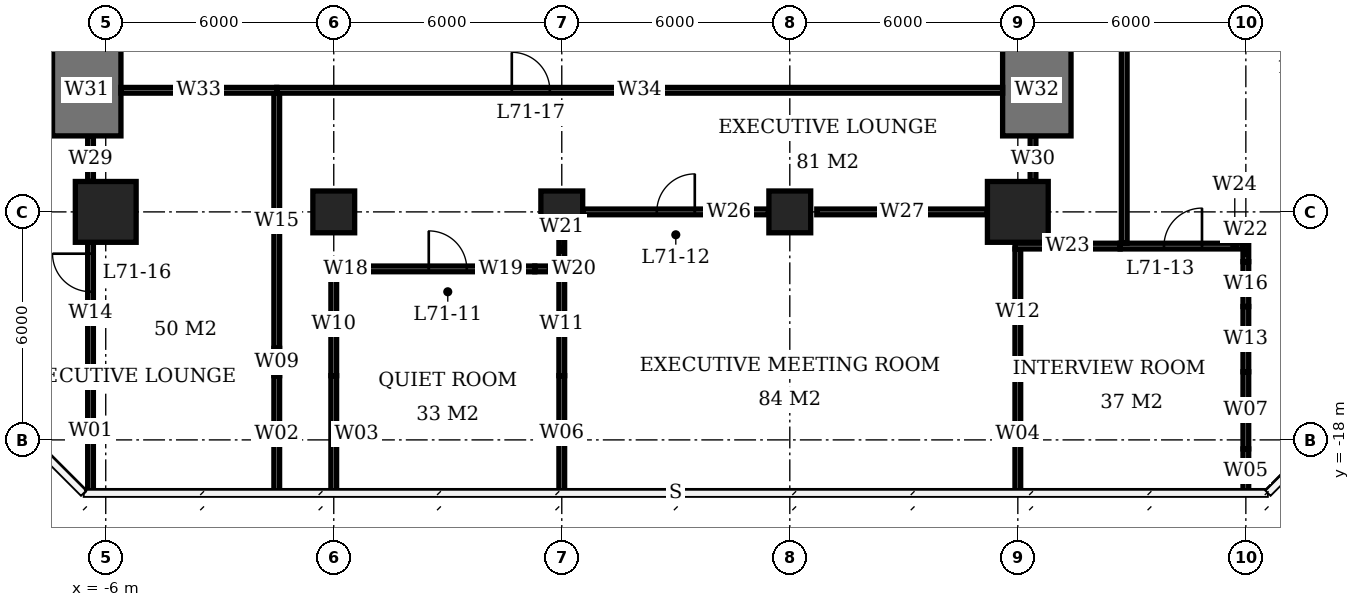
"""IFC4 building model, lengths in metres.
Left out: names, types, materials, properties, quantities, classifications, styles, units other than length and angle.
Written with IfcOpenShell. Run it as: python <this file> out.ifc"""

import sys

from ifc_helpers import new_model, si_unit, direction, frame, frame_2d, origin, origin_2d, place, context, subcontext, project, spatial, rectangle, extrude, element, fill, save


model = new_model("IFC4")
c1 = context("Model", 3, precision=1e-05, world=origin(), true_north=direction((0.0, 1.0)))
c2 = subcontext(c1, "Body", "Model", "MODEL_VIEW")
j1 = project(units=[si_unit("LENGTHUNIT", "METRE"), si_unit("PLANEANGLEUNIT", "RADIAN")], contexts=[c1])
p1 = place(None, origin())
s1 = spatial("IfcSite", under=j1, at=p1, CompositionType="ELEMENT")
p2 = place(p1, origin())
s2 = spatial("IfcBuilding", under=s1, at=p2, CompositionType="ELEMENT")
p3 = place(p2, frame((0.0, 0.0, 287.9)))
s3 = spatial("IfcBuildingStorey", under=s2, at=p3, CompositionType="ELEMENT", Elevation=287.9)
p4 = place(p3, frame((-6.0, -12.0, 0.0), z_axis=(0.0, 0.0, 1.0), x_axis=(1.0, 0.0, 0.0)))
e1 = element("IfcColumn", 1, at=p4, inside=s3, PredefinedType="COLUMN", context=c2, shape_type="SweptSolid", body=[
    extrude(rectangle(XDim=1.6, YDim=1.6, at=origin_2d()), origin(), (0.0, 0.0, 1.0), 3.9),
])
for number, where, z_axis, x_axis in (
    (2, (0.0, -12.0, 0.0), (0.0, 0.0, 1.0), (1.0, 0.0, 0.0)),
    (3, (6.0, -12.0, 0.0), (0.0, 0.0, 1.0), (1.0, 0.0, 0.0)),
    (4, (12.0, -12.0, 0.0), (0.0, 0.0, 1.0), (1.0, 0.0, 0.0)),
):
    element("IfcColumn", number, at=place(p3, frame(where, z_axis=z_axis, x_axis=x_axis)), inside=s3, PredefinedType="COLUMN", context=c2, shape_type="SweptSolid", body=[
        extrude(rectangle(XDim=1.1, YDim=1.1, at=origin_2d()), origin(), (0.0, 0.0, 1.0), 3.9),
    ])
p5 = place(p3, frame((18.0, -12.0, 0.0), z_axis=(0.0, 0.0, 1.0), x_axis=(1.0, 0.0, 0.0)))
e5 = element("IfcColumn", 5, at=p5, inside=s3, PredefinedType="COLUMN", context=c2, shape_type="SweptSolid", body=[
    extrude(rectangle(XDim=1.6, YDim=1.6, at=origin_2d()), origin(), (0.0, 0.0, 1.0), 3.9),
])
for number, where, z_axis, x_axis in (
    (6, (-6.5, -10.0, 0.0), (0.0, 0.0, 1.0), (0.0, 1.0, 0.0)),
    (7, (18.5, -10.0, 0.0), (0.0, 0.0, 1.0), (0.0, 1.0, 0.0)),
):
    element("IfcWall", number, at=place(p3, frame(where, z_axis=z_axis, x_axis=x_axis)), inside=s3, PredefinedType="SHEAR", context=c2, shape_type="SweptSolid", body=[
        extrude(rectangle(XDim=2.4, YDim=1.8, at=frame_2d((1.2, 0.0))), origin(), (0.0, 0.0, 1.0), 3.9),
    ])
p6 = place(p3, frame((-0.075, -13.5, 0.0), z_axis=(0.0, 0.0, 1.0), x_axis=(1.0, 0.0, 0.0)))
e8 = element("IfcWall", 8, at=p6, inside=s3, PredefinedType="PARTITIONING", context=c2, shape_type="SweptSolid", body=[
    extrude(rectangle(XDim=0.785, YDim=0.15, at=frame_2d((0.393, 0.0))), origin(), (0.0, 0.0, 1.0), 2.65),
])
p7 = place(p3, frame((0.71, -13.5, 0.0), z_axis=(0.0, 0.0, 1.0), x_axis=(1.0, 0.0, 0.0)))
e9 = element("IfcWall", 9, at=p7, inside=s3, PredefinedType="PARTITIONING", context=c2, shape_type="SweptSolid", body=[
    extrude(rectangle(XDim=4.58, YDim=0.15, at=frame_2d((2.29, 0.0))), origin(), (0.0, 0.0, 1.0), 3.65),
])
p8 = place(p7, frame((1.79, 0.0, 0.0)))
e10 = element("IfcOpeningElement", 10, at=p8, cuts=e9, PredefinedType="OPENING", context=c2, shape_type="SweptSolid", body=[
    extrude(rectangle(XDim=1.0, YDim=2.4, at=frame_2d((0.5, 1.2))), frame((0.0, 0.085, 0.0), z_axis=(0.0, -1.0, 0.0), x_axis=(1.0, 0.0, 0.0)), (0.0, 0.0, 1.0), 0.17),
])
p9 = place(p3, frame((5.29, -13.5, 0.0), z_axis=(0.0, 0.0, 1.0), x_axis=(1.0, 0.0, 0.0)))
e11 = element("IfcWall", 11, at=p9, inside=s3, PredefinedType="PARTITIONING", context=c2, shape_type="SweptSolid", body=[
    extrude(rectangle(XDim=0.86, YDim=0.15, at=frame_2d((0.43, 0.0))), origin(), (0.0, 0.0, 1.0), 2.65),
])
p10 = place(p3, frame((17.925, -12.9, 0.0), z_axis=(0.0, 0.0, 1.0), x_axis=(1.0, 0.0, 0.0)))
e12 = element("IfcWall", 12, at=p10, inside=s3, PredefinedType="PARTITIONING", context=c2, shape_type="SweptSolid", body=[
    extrude(rectangle(XDim=2.767, YDim=0.15, at=frame_2d((1.384, 0.0))), origin(), (0.0, 0.0, 1.0), 2.65),
])
p11 = place(p3, frame((20.692, -12.9, 0.0), z_axis=(0.0, 0.0, 1.0), x_axis=(1.0, 0.0, 0.0)))
e13 = element("IfcWall", 13, at=p11, inside=s3, PredefinedType="PARTITIONING", context=c2, shape_type="SweptSolid", body=[
    extrude(rectangle(XDim=3.233, YDim=0.15, at=frame_2d((1.616, 0.0))), origin(), (0.0, 0.0, 1.0), 3.65),
])
p12 = place(p11, frame((1.154, 0.0, 0.0)))
e14 = element("IfcOpeningElement", 14, at=p12, cuts=e13, PredefinedType="OPENING", context=c2, shape_type="SweptSolid", body=[
    extrude(rectangle(XDim=1.0, YDim=2.4, at=frame_2d((0.5, 1.2))), frame((0.0, 0.085, 0.0), z_axis=(0.0, -1.0, 0.0), x_axis=(1.0, 0.0, 0.0)), (0.0, 0.0, 1.0), 0.17),
])
p13 = place(p3, frame((6.56, -12.0, 0.0), z_axis=(0.0, 0.0, 1.0), x_axis=(1.0, 0.0, 0.0)))
e15 = element("IfcWall", 15, at=p13, inside=s3, PredefinedType="PARTITIONING", context=c2, shape_type="SweptSolid", body=[
    extrude(rectangle(XDim=4.88, YDim=0.15, at=frame_2d((2.44, 0.0))), origin(), (0.0, 0.0, 1.0), 3.65),
])
p14 = place(p13, frame((1.94, 0.0, 0.0)))
e16 = element("IfcOpeningElement", 16, at=p14, cuts=e15, PredefinedType="OPENING", context=c2, shape_type="SweptSolid", body=[
    extrude(rectangle(XDim=1.0, YDim=2.4, at=frame_2d((0.5, 1.2))), frame((0.0, 0.085, 0.0), z_axis=(0.0, -1.0, 0.0), x_axis=(1.0, 0.0, 0.0)), (0.0, 0.0, 1.0), 0.17),
])
p15 = place(p3, frame((12.71, -12.0, 0.0), z_axis=(0.0, 0.0, 1.0), x_axis=(1.0, 0.0, 0.0)))
e17 = element("IfcWall", 17, at=p15, inside=s3, PredefinedType="PARTITIONING", context=c2, shape_type="SweptSolid", body=[
    extrude(rectangle(XDim=4.49, YDim=0.15, at=frame_2d((2.245, 0.0))), origin(), (0.0, 0.0, 1.0), 3.65),
])
p16 = place(p3, frame((0.0, -19.375, 0.0), z_axis=(0.0, 0.0, 1.0), x_axis=(0.0, 1.0, 0.0)))
e18 = element("IfcWall", 18, at=p16, inside=s3, PredefinedType="PARTITIONING", context=c2, shape_type="SweptSolid", body=[
    extrude(rectangle(XDim=3.065, YDim=0.15, at=frame_2d((1.532, 0.0))), origin(), (0.0, 0.0, 1.0), 3.65),
])
p17 = place(p3, frame((0.0, -16.31, 0.0), z_axis=(0.0, 0.0, 1.0), x_axis=(0.0, 1.0, 0.0)))
e19 = element("IfcWall", 19, at=p17, inside=s3, PredefinedType="PARTITIONING", context=c2, shape_type="SweptSolid", body=[
    extrude(rectangle(XDim=2.735, YDim=0.15, at=frame_2d((1.368, 0.0))), origin(), (0.0, 0.0, 1.0), 2.65),
])
p18 = place(p3, frame((6.0, -19.35, 0.0), z_axis=(0.0, 0.0, 1.0), x_axis=(0.0, 1.0, 0.0)))
e20 = element("IfcWall", 20, at=p18, inside=s3, PredefinedType="PARTITIONING", context=c2, shape_type="SweptSolid", body=[
    extrude(rectangle(XDim=3.04, YDim=0.15, at=frame_2d((1.52, 0.0))), origin(), (0.0, 0.0, 1.0), 3.65),
])
p19 = place(p3, frame((6.0, -16.31, 0.0), z_axis=(0.0, 0.0, 1.0), x_axis=(0.0, 1.0, 0.0)))
e21 = element("IfcWall", 21, at=p19, inside=s3, PredefinedType="PARTITIONING", context=c2, shape_type="SweptSolid", body=[
    extrude(rectangle(XDim=2.735, YDim=0.15, at=frame_2d((1.368, 0.0))), origin(), (0.0, 0.0, 1.0), 2.65),
])
p20 = place(p3, frame((6.0, -13.425, 0.0), z_axis=(0.0, 0.0, 1.0), x_axis=(0.0, 1.0, 0.0)))
e22 = element("IfcWall", 22, at=p20, inside=s3, PredefinedType="PARTITIONING", context=c2, shape_type="SweptSolid", body=[
    extrude(rectangle(XDim=0.875, YDim=0.15, at=frame_2d((0.438, 0.0))), origin(), (0.0, 0.0, 1.0), 2.65),
])
p21 = place(p3, frame((18.0, -19.375, 0.0), z_axis=(0.0, 0.0, 1.0), x_axis=(0.0, 1.0, 0.0)))
e23 = element("IfcWall", 23, at=p21, inside=s3, PredefinedType="PARTITIONING", context=c2, shape_type="SweptSolid", body=[
    extrude(rectangle(XDim=3.065, YDim=0.15, at=frame_2d((1.532, 0.0))), origin(), (0.0, 0.0, 1.0), 3.65),
])
p22 = place(p3, frame((18.0, -16.31, 0.0), z_axis=(0.0, 0.0, 1.0), x_axis=(0.0, 1.0, 0.0)))
e24 = element("IfcWall", 24, at=p22, inside=s3, PredefinedType="PARTITIONING", context=c2, shape_type="SweptSolid", body=[
    extrude(rectangle(XDim=3.335, YDim=0.15, at=frame_2d((1.667, 0.0))), origin(), (0.0, 0.0, 1.0), 2.65),
])
p23 = place(p3, frame((24.0, -19.375, 0.0), z_axis=(0.0, 0.0, 1.0), x_axis=(0.0, 1.0, 0.0)))
e25 = element("IfcWall", 25, at=p23, inside=s3, PredefinedType="PARTITIONING", context=c2, shape_type="SweptSolid", body=[
    extrude(rectangle(XDim=1.138, YDim=0.15, at=frame_2d((0.569, 0.0))), origin(), (0.0, 0.0, 1.0), 3.65),
])
p24 = place(p3, frame((24.0, -18.237, 0.0), z_axis=(0.0, 0.0, 1.0), x_axis=(0.0, 1.0, 0.0)))
e26 = element("IfcWall", 26, at=p24, inside=s3, PredefinedType="PARTITIONING", context=c2, shape_type="SweptSolid", body=[
    extrude(rectangle(XDim=2.029, YDim=0.15, at=frame_2d((1.015, 0.0))), origin(), (0.0, 0.0, 1.0), 2.65),
])
p25 = place(p3, frame((24.0, -16.208, 0.0), z_axis=(0.0, 0.0, 1.0), x_axis=(0.0, 1.0, 0.0)))
e27 = element("IfcWall", 27, at=p25, inside=s3, PredefinedType="PARTITIONING", context=c2, shape_type="SweptSolid", body=[
    extrude(rectangle(XDim=1.718, YDim=0.15, at=frame_2d((0.859, 0.0))), origin(), (0.0, 0.0, 1.0), 3.65),
])
p26 = place(p3, frame((24.0, -14.49, 0.0), z_axis=(0.0, 0.0, 1.0), x_axis=(0.0, 1.0, 0.0)))
e28 = element("IfcWall", 28, at=p26, inside=s3, PredefinedType="PARTITIONING", context=c2, shape_type="SweptSolid", body=[
    extrude(rectangle(XDim=1.18, YDim=0.15, at=frame_2d((0.59, 0.0))), origin(), (0.0, 0.0, 1.0), 2.65),
])
p27 = place(p3, frame((24.0, -13.31, 0.0), z_axis=(0.0, 0.0, 1.0), x_axis=(0.0, 1.0, 0.0)))
e29 = element("IfcWall", 29, at=p27, inside=s3, PredefinedType="PARTITIONING", context=c2, shape_type="SweptSolid", body=[
    extrude(rectangle(XDim=0.485, YDim=0.15, at=frame_2d((0.243, 0.0))), origin(), (0.0, 0.0, 1.0), 3.65),
])
p28 = place(p3, frame((-6.4, -19.375, 0.0), z_axis=(0.0, 0.0, 1.0), x_axis=(0.0, 1.0, 0.0)))
e30 = element("IfcWall", 30, at=p28, inside=s3, PredefinedType="PARTITIONING", context=c2, shape_type="SweptSolid", body=[
    extrude(rectangle(XDim=3.235, YDim=0.15, at=frame_2d((1.618, 0.0))), origin(), (0.0, 0.0, 1.0), 3.65),
])
p29 = place(p3, frame((-6.4, -16.14, 0.0), z_axis=(0.0, 0.0, 1.0), x_axis=(0.0, 1.0, 0.0)))
e31 = element("IfcWall", 31, at=p29, inside=s3, PredefinedType="PARTITIONING", context=c2, shape_type="SweptSolid", body=[
    extrude(rectangle(XDim=3.34, YDim=0.15, at=frame_2d((1.67, 0.0))), origin(), (0.0, 0.0, 1.0), 2.65),
])
p30 = place(p29, frame((2.04, 0.0, 0.0)))
e32 = element("IfcOpeningElement", 32, at=p30, cuts=e31, PredefinedType="OPENING", context=c2, shape_type="SweptSolid", body=[
    extrude(rectangle(XDim=1.0, YDim=2.4, at=frame_2d((0.5, 1.2))), frame((0.0, 0.085, 0.0), z_axis=(0.0, -1.0, 0.0), x_axis=(1.0, 0.0, 0.0)), (0.0, 0.0, 1.0), 0.17),
])
p31 = place(p3, frame((-6.4, -11.2, 0.0), z_axis=(0.0, 0.0, 1.0), x_axis=(0.0, 1.0, 0.0)))
e33 = element("IfcWall", 33, at=p31, inside=s3, PredefinedType="PARTITIONING", context=c2, shape_type="SweptSolid", body=[
    extrude(rectangle(XDim=1.2, YDim=0.15, at=frame_2d((0.6, 0.0))), origin(), (0.0, 0.0, 1.0), 3.65),
])
p32 = place(p3, frame((-5.6, -8.8, 0.0), z_axis=(0.0, 0.0, 1.0), x_axis=(1.0, 0.0, 0.0)))
e34 = element("IfcWall", 34, at=p32, inside=s3, PredefinedType="PARTITIONING", context=c2, shape_type="SweptSolid", body=[
    extrude(rectangle(XDim=4.1, YDim=0.15, at=frame_2d((2.05, 0.0))), origin(), (0.0, 0.0, 1.0), 3.65),
])
p33 = place(p3, frame((-1.5, -19.375, 0.0), z_axis=(0.0, 0.0, 1.0), x_axis=(0.0, 1.0, 0.0)))
e35 = element("IfcWall", 35, at=p33, inside=s3, PredefinedType="PARTITIONING", context=c2, shape_type="SweptSolid", body=[
    extrude(rectangle(XDim=3.065, YDim=0.15, at=frame_2d((1.532, 0.0))), origin(), (0.0, 0.0, 1.0), 3.65),
])
p34 = place(p3, frame((-1.5, -16.31, 0.0), z_axis=(0.0, 0.0, 1.0), x_axis=(0.0, 1.0, 0.0)))
e36 = element("IfcWall", 36, at=p34, inside=s3, PredefinedType="PARTITIONING", context=c2, shape_type="SweptSolid", body=[
    extrude(rectangle(XDim=0.72, YDim=0.15, at=frame_2d((0.36, 0.0))), origin(), (0.0, 0.0, 1.0), 2.65),
])
p35 = place(p3, frame((-1.5, -15.59, 0.0), z_axis=(0.0, 0.0, 1.0), x_axis=(0.0, 1.0, 0.0)))
e37 = element("IfcWall", 37, at=p35, inside=s3, PredefinedType="PARTITIONING", context=c2, shape_type="SweptSolid", body=[
    extrude(rectangle(XDim=6.715, YDim=0.15, at=frame_2d((3.357, 0.0))), origin(), (0.0, 0.0, 1.0), 3.65),
])
p36 = place(p3, frame((-1.5, -8.8, 0.0), z_axis=(0.0, 0.0, 1.0), x_axis=(1.0, 0.0, 0.0)))
e38 = element("IfcWall", 38, at=p36, inside=s3, PredefinedType="PARTITIONING", context=c2, shape_type="SweptSolid", body=[
    extrude(rectangle(XDim=19.1, YDim=0.15, at=frame_2d((9.55, 0.0))), origin(), (0.0, 0.0, 1.0), 3.65),
])
p37 = place(p36, frame((6.185, 0.0, 0.0)))
e39 = element("IfcOpeningElement", 39, at=p37, cuts=e38, PredefinedType="OPENING", context=c2, shape_type="SweptSolid", body=[
    extrude(rectangle(XDim=1.0, YDim=2.4, at=frame_2d((0.5, 1.2))), frame((0.0, 0.085, 0.0), z_axis=(0.0, -1.0, 0.0), x_axis=(1.0, 0.0, 0.0)), (0.0, 0.0, 1.0), 0.17),
])
p38 = place(p3, frame((18.4, -11.2, 0.0), z_axis=(0.0, 0.0, 1.0), x_axis=(0.0, 1.0, 0.0)))
e40 = element("IfcWall", 40, at=p38, inside=s3, PredefinedType="PARTITIONING", context=c2, shape_type="SweptSolid", body=[
    extrude(rectangle(XDim=1.2, YDim=0.15, at=frame_2d((0.6, 0.0))), origin(), (0.0, 0.0, 1.0), 3.65),
])
p39 = place(p3, frame((20.8, -12.825, 0.0), z_axis=(0.0, 0.0, 1.0), x_axis=(0.0, 1.0, 0.0)))
e41 = element("IfcWall", 41, at=p39, inside=s3, PredefinedType="PARTITIONING", context=c2, shape_type="SweptSolid", body=[
    extrude(rectangle(XDim=20.25, YDim=0.15, at=frame_2d((10.125, 0.0))), origin(), (0.0, 0.0, 1.0), 3.65),
])
p40 = place(p39, frame((12.711, 0.0, 0.0)))
e42 = element("IfcOpeningElement", 42, at=p40, cuts=e41, PredefinedType="OPENING", context=c2, shape_type="SweptSolid", body=[
    extrude(rectangle(XDim=1.0, YDim=2.4, at=frame_2d((0.5, 1.2))), frame((0.0, 0.085, 0.0), z_axis=(0.0, -1.0, 0.0), x_axis=(1.0, 0.0, 0.0)), (0.0, 0.0, 1.0), 0.17),
])
p41 = place(p8, origin())
e43 = element("IfcDoor", 43, at=p41, inside=s3, OperationType="SINGLE_SWING_LEFT", PredefinedType="DOOR", context=c2, shape_type="SweptSolid", body=[
    extrude(rectangle(XDim=1.0, YDim=2.4, at=frame_2d((0.5, 1.2))), frame((0.0, 0.025, 0.0), z_axis=(0.0, -1.0, 0.0), x_axis=(1.0, 0.0, 0.0)), (0.0, 0.0, 1.0), 0.05),
])
fill(e10, e43)
p42 = place(p14, origin())
e44 = element("IfcDoor", 44, at=p42, inside=s3, OperationType="SINGLE_SWING_RIGHT", PredefinedType="DOOR", context=c2, shape_type="SweptSolid", body=[
    extrude(rectangle(XDim=1.0, YDim=2.4, at=frame_2d((0.5, 1.2))), frame((0.0, 0.025, 0.0), z_axis=(0.0, -1.0, 0.0), x_axis=(1.0, 0.0, 0.0)), (0.0, 0.0, 1.0), 0.05),
])
fill(e16, e44)
p43 = place(p12, origin())
e45 = element("IfcDoor", 45, at=p43, inside=s3, OperationType="SINGLE_SWING_RIGHT", PredefinedType="DOOR", context=c2, shape_type="SweptSolid", body=[
    extrude(rectangle(XDim=1.0, YDim=2.4, at=frame_2d((0.5, 1.2))), frame((0.0, 0.025, 0.0), z_axis=(0.0, -1.0, 0.0), x_axis=(1.0, 0.0, 0.0)), (0.0, 0.0, 1.0), 0.05),
])
fill(e14, e45)
p44 = place(p30, origin())
e46 = element("IfcDoor", 46, at=p44, inside=s3, OperationType="SINGLE_SWING_RIGHT", PredefinedType="DOOR", context=c2, shape_type="SweptSolid", body=[
    extrude(rectangle(XDim=1.0, YDim=2.4, at=frame_2d((0.5, 1.2))), frame((0.0, 0.025, 0.0), z_axis=(0.0, -1.0, 0.0), x_axis=(1.0, 0.0, 0.0)), (0.0, 0.0, 1.0), 0.05),
])
fill(e32, e46)
p45 = place(p37, origin())
e47 = element("IfcDoor", 47, at=p45, inside=s3, OperationType="SINGLE_SWING_LEFT", PredefinedType="DOOR", context=c2, shape_type="SweptSolid", body=[
    extrude(rectangle(XDim=1.0, YDim=2.4, at=frame_2d((0.5, 1.2))), frame((0.0, 0.025, 0.0), z_axis=(0.0, -1.0, 0.0), x_axis=(1.0, 0.0, 0.0)), (0.0, 0.0, 1.0), 0.05),
])
fill(e39, e47)
save(model, sys.argv[1])
